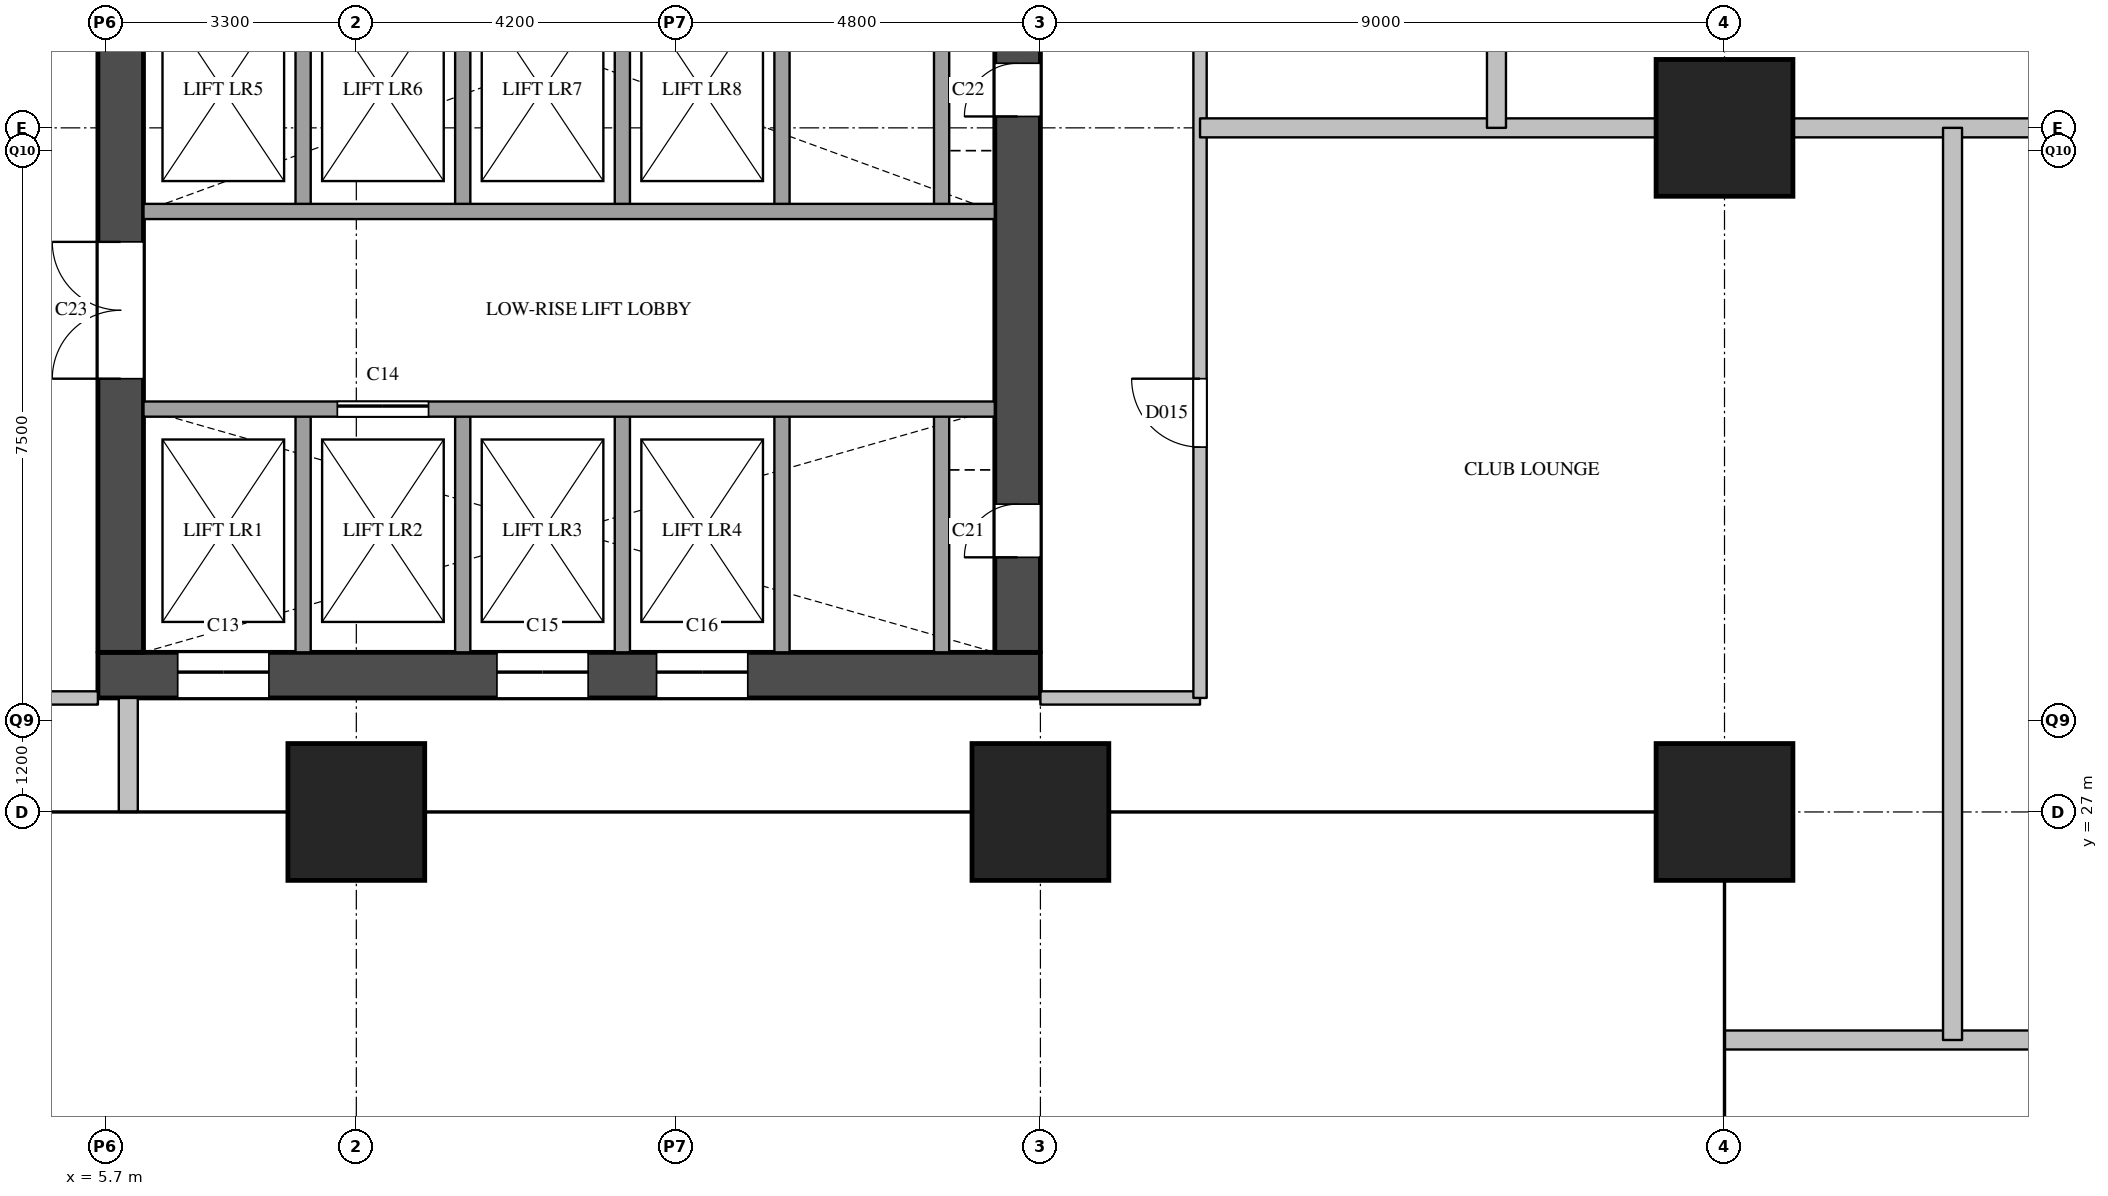
"""IFC4 building model, lengths in metres.
Left out: names, types, materials, properties, quantities, classifications, styles, units other than length and angle.
Written with IfcOpenShell. Run it as: python <this file> out.ifc"""

import sys

from ifc_helpers import new_model, si_unit, direction, frame, frame_2d, origin, origin_2d, place, context, subcontext, project, spatial, rectangle, extrude, element, fill, save


model = new_model("IFC4")
c1 = context("Model", 3, precision=1e-05, world=origin(), true_north=direction((0.0, 1.0)))
c2 = subcontext(c1, "Body", "Model", "MODEL_VIEW")
j1 = project(units=[si_unit("LENGTHUNIT", "METRE"), si_unit("PLANEANGLEUNIT", "RADIAN")], contexts=[c1])
p1 = place(None, origin())
s1 = spatial("IfcSite", under=j1, at=p1, CompositionType="ELEMENT")
p2 = place(p1, origin())
s2 = spatial("IfcBuilding", under=s1, at=p2, CompositionType="ELEMENT")
p3 = place(p2, frame((0.0, 0.0, 93.0)))
s3 = spatial("IfcBuildingStorey", under=s2, at=p3, CompositionType="ELEMENT", Elevation=93.0)
for number, where, z_axis, x_axis in (
    (1, (9.0, 27.0, 0.0), (0.0, 0.0, 1.0), (1.0, 0.0, 0.0)),
    (2, (18.0, 27.0, 0.0), (0.0, 0.0, 1.0), (1.0, 0.0, 0.0)),
    (3, (27.0, 27.0, 0.0), (0.0, 0.0, 1.0), (1.0, 0.0, 0.0)),
    (4, (27.0, 36.0, 0.0), (0.0, 0.0, 1.0), (1.0, 0.0, 0.0)),
):
    element("IfcColumn", number, at=place(p3, frame(where, z_axis=z_axis, x_axis=x_axis)), inside=s3, PredefinedType="COLUMN", context=c2, shape_type="SweptSolid", body=[
        extrude(rectangle(XDim=1.8, YDim=1.8, at=origin_2d()), origin(), (0.0, 0.0, 1.0), 3.8),
    ])
p4 = place(p3, frame((5.6, 28.8, 0.0), z_axis=(0.0, 0.0, 1.0), x_axis=(1.0, 0.0, 0.0)))
e5 = element("IfcWall", 5, at=p4, inside=s3, PredefinedType="SHEAR", context=c2, shape_type="SweptSolid", body=[
    extrude(rectangle(XDim=12.4, YDim=0.6, at=frame_2d((6.2, 0.0))), origin(), (0.0, 0.0, 1.0), 3.5),
])
p5 = place(p4, frame((1.05, 0.0, 0.0)))
e6 = element("IfcOpeningElement", 6, at=p5, cuts=e5, PredefinedType="OPENING", context=c2, shape_type="SweptSolid", body=[
    extrude(rectangle(XDim=1.2, YDim=2.1, at=frame_2d((0.6, 1.05))), frame((0.0, 0.31, 0.0), z_axis=(0.0, -1.0, 0.0), x_axis=(1.0, 0.0, 0.0)), (0.0, 0.0, 1.0), 0.62),
])
p6 = place(p4, frame((5.25, 0.0, 0.0)))
e7 = element("IfcOpeningElement", 7, at=p6, cuts=e5, PredefinedType="OPENING", context=c2, shape_type="SweptSolid", body=[
    extrude(rectangle(XDim=1.2, YDim=2.1, at=frame_2d((0.6, 1.05))), frame((0.0, 0.31, 0.0), z_axis=(0.0, -1.0, 0.0), x_axis=(1.0, 0.0, 0.0)), (0.0, 0.0, 1.0), 0.62),
])
p7 = place(p4, frame((7.35, 0.0, 0.0)))
e8 = element("IfcOpeningElement", 8, at=p7, cuts=e5, PredefinedType="OPENING", context=c2, shape_type="SweptSolid", body=[
    extrude(rectangle(XDim=1.2, YDim=2.1, at=frame_2d((0.6, 1.05))), frame((0.0, 0.31, 0.0), z_axis=(0.0, -1.0, 0.0), x_axis=(1.0, 0.0, 0.0)), (0.0, 0.0, 1.0), 0.62),
])
p8 = place(p3, frame((5.9, 29.1, 0.0), z_axis=(0.0, 0.0, 1.0), x_axis=(0.0, 1.0, 0.0)))
e9 = element("IfcWall", 9, at=p8, inside=s3, PredefinedType="SHEAR", context=c2, shape_type="SweptSolid", body=[
    extrude(rectangle(XDim=20.3, YDim=0.6, at=frame_2d((10.15, 0.0))), origin(), (0.0, 0.0, 1.0), 3.5),
])
p9 = place(p8, frame((3.6, 0.0, 0.0)))
e10 = element("IfcOpeningElement", 10, at=p9, cuts=e9, PredefinedType="OPENING", context=c2, shape_type="SweptSolid", body=[
    extrude(rectangle(XDim=1.8, YDim=2.1, at=frame_2d((0.9, 1.05))), frame((0.0, 0.31, 0.0), z_axis=(0.0, -1.0, 0.0), x_axis=(1.0, 0.0, 0.0)), (0.0, 0.0, 1.0), 0.62),
])
p10 = place(p8, frame((16.4, 0.0, 0.0)))
e11 = element("IfcOpeningElement", 11, at=p10, cuts=e9, PredefinedType="OPENING", context=c2, shape_type="SweptSolid", body=[
    extrude(rectangle(XDim=1.0, YDim=2.1, at=frame_2d((0.5, 1.05))), frame((0.0, 0.31, 0.0), z_axis=(0.0, -1.0, 0.0), x_axis=(1.0, 0.0, 0.0)), (0.0, 0.0, 1.0), 0.62),
])
p11 = place(p3, frame((17.7, 29.1, 0.0), z_axis=(0.0, 0.0, 1.0), x_axis=(0.0, 1.0, 0.0)))
e12 = element("IfcWall", 12, at=p11, inside=s3, PredefinedType="SHEAR", context=c2, shape_type="SweptSolid", body=[
    extrude(rectangle(XDim=20.3, YDim=0.6, at=frame_2d((10.15, 0.0))), origin(), (0.0, 0.0, 1.0), 3.5),
])
p12 = place(p11, frame((1.25, 0.0, 0.0)))
e13 = element("IfcOpeningElement", 13, at=p12, cuts=e12, PredefinedType="OPENING", context=c2, shape_type="SweptSolid", body=[
    extrude(rectangle(XDim=0.7, YDim=2.1, at=frame_2d((0.35, 1.05))), frame((0.0, 0.31, 0.0), z_axis=(0.0, -1.0, 0.0), x_axis=(1.0, 0.0, 0.0)), (0.0, 0.0, 1.0), 0.62),
])
p13 = place(p11, frame((7.05, 0.0, 0.0)))
e14 = element("IfcOpeningElement", 14, at=p13, cuts=e12, PredefinedType="OPENING", context=c2, shape_type="SweptSolid", body=[
    extrude(rectangle(XDim=0.7, YDim=2.1, at=frame_2d((0.35, 1.05))), frame((0.0, 0.31, 0.0), z_axis=(0.0, -1.0, 0.0), x_axis=(1.0, 0.0, 0.0)), (0.0, 0.0, 1.0), 0.62),
])
p14 = place(p3, frame((8.3, 29.1, 0.0), z_axis=(0.0, 0.0, 1.0), x_axis=(0.0, 1.0, 0.0)))
e15 = element("IfcWall", 15, at=p14, inside=s3, PredefinedType="SOLIDWALL", context=c2, shape_type="SweptSolid", body=[
    extrude(rectangle(XDim=3.2, YDim=0.2, at=frame_2d((1.6, 0.0))), origin(), (0.0, 0.0, 1.0), 3.5),
])
p15 = place(p3, frame((8.3, 34.9, 0.0), z_axis=(0.0, 0.0, 1.0), x_axis=(0.0, 1.0, 0.0)))
e16 = element("IfcWall", 16, at=p15, inside=s3, PredefinedType="SOLIDWALL", context=c2, shape_type="SweptSolid", body=[
    extrude(rectangle(XDim=3.2, YDim=0.2, at=frame_2d((1.6, 0.0))), origin(), (0.0, 0.0, 1.0), 3.5),
])
p16 = place(p3, frame((10.4, 29.1, 0.0), z_axis=(0.0, 0.0, 1.0), x_axis=(0.0, 1.0, 0.0)))
e17 = element("IfcWall", 17, at=p16, inside=s3, PredefinedType="SOLIDWALL", context=c2, shape_type="SweptSolid", body=[
    extrude(rectangle(XDim=3.2, YDim=0.2, at=frame_2d((1.6, 0.0))), origin(), (0.0, 0.0, 1.0), 3.5),
])
p17 = place(p3, frame((10.4, 34.9, 0.0), z_axis=(0.0, 0.0, 1.0), x_axis=(0.0, 1.0, 0.0)))
e18 = element("IfcWall", 18, at=p17, inside=s3, PredefinedType="SOLIDWALL", context=c2, shape_type="SweptSolid", body=[
    extrude(rectangle(XDim=3.2, YDim=0.2, at=frame_2d((1.6, 0.0))), origin(), (0.0, 0.0, 1.0), 3.5),
])
p18 = place(p3, frame((12.5, 29.1, 0.0), z_axis=(0.0, 0.0, 1.0), x_axis=(0.0, 1.0, 0.0)))
e19 = element("IfcWall", 19, at=p18, inside=s3, PredefinedType="SOLIDWALL", context=c2, shape_type="SweptSolid", body=[
    extrude(rectangle(XDim=3.2, YDim=0.2, at=frame_2d((1.6, 0.0))), origin(), (0.0, 0.0, 1.0), 3.5),
])
p19 = place(p3, frame((12.5, 34.9, 0.0), z_axis=(0.0, 0.0, 1.0), x_axis=(0.0, 1.0, 0.0)))
e20 = element("IfcWall", 20, at=p19, inside=s3, PredefinedType="SOLIDWALL", context=c2, shape_type="SweptSolid", body=[
    extrude(rectangle(XDim=3.2, YDim=0.2, at=frame_2d((1.6, 0.0))), origin(), (0.0, 0.0, 1.0), 3.5),
])
p20 = place(p3, frame((14.6, 29.1, 0.0), z_axis=(0.0, 0.0, 1.0), x_axis=(0.0, 1.0, 0.0)))
e21 = element("IfcWall", 21, at=p20, inside=s3, PredefinedType="SOLIDWALL", context=c2, shape_type="SweptSolid", body=[
    extrude(rectangle(XDim=3.2, YDim=0.2, at=frame_2d((1.6, 0.0))), origin(), (0.0, 0.0, 1.0), 3.5),
])
p21 = place(p3, frame((14.6, 34.9, 0.0), z_axis=(0.0, 0.0, 1.0), x_axis=(0.0, 1.0, 0.0)))
e22 = element("IfcWall", 22, at=p21, inside=s3, PredefinedType="SOLIDWALL", context=c2, shape_type="SweptSolid", body=[
    extrude(rectangle(XDim=3.2, YDim=0.2, at=frame_2d((1.6, 0.0))), origin(), (0.0, 0.0, 1.0), 3.5),
])
p22 = place(p3, frame((16.7, 29.1, 0.0), z_axis=(0.0, 0.0, 1.0), x_axis=(0.0, 1.0, 0.0)))
e23 = element("IfcWall", 23, at=p22, inside=s3, PredefinedType="SOLIDWALL", context=c2, shape_type="SweptSolid", body=[
    extrude(rectangle(XDim=3.2, YDim=0.2, at=frame_2d((1.6, 0.0))), origin(), (0.0, 0.0, 1.0), 3.5),
])
p23 = place(p3, frame((16.7, 34.9, 0.0), z_axis=(0.0, 0.0, 1.0), x_axis=(0.0, 1.0, 0.0)))
e24 = element("IfcWall", 24, at=p23, inside=s3, PredefinedType="SOLIDWALL", context=c2, shape_type="SweptSolid", body=[
    extrude(rectangle(XDim=3.2, YDim=0.2, at=frame_2d((1.6, 0.0))), origin(), (0.0, 0.0, 1.0), 3.5),
])
p24 = place(p3, frame((6.2, 32.3, 0.0), z_axis=(0.0, 0.0, 1.0), x_axis=(1.0, 0.0, 0.0)))
e25 = element("IfcWall", 25, at=p24, inside=s3, PredefinedType="SOLIDWALL", context=c2, shape_type="SweptSolid", body=[
    extrude(rectangle(XDim=11.2, YDim=0.2, at=frame_2d((5.6, 0.0))), origin(), (0.0, 0.0, 1.0), 3.5),
])
p25 = place(p24, frame((2.55, 0.0, 0.0)))
e26 = element("IfcOpeningElement", 26, at=p25, cuts=e25, PredefinedType="OPENING", context=c2, shape_type="SweptSolid", body=[
    extrude(rectangle(XDim=1.2, YDim=2.1, at=frame_2d((0.6, 1.05))), frame((0.0, 0.11, 0.0), z_axis=(0.0, -1.0, 0.0), x_axis=(1.0, 0.0, 0.0)), (0.0, 0.0, 1.0), 0.22),
])
p26 = place(p3, frame((6.2, 34.9, 0.0), z_axis=(0.0, 0.0, 1.0), x_axis=(1.0, 0.0, 0.0)))
e27 = element("IfcWall", 27, at=p26, inside=s3, PredefinedType="SOLIDWALL", context=c2, shape_type="SweptSolid", body=[
    extrude(rectangle(XDim=11.2, YDim=0.2, at=frame_2d((5.6, 0.0))), origin(), (0.0, 0.0, 1.0), 3.5),
])
for number, where, z_axis, x_axis in (
    (28, (3.5, 28.5, 0.0), (0.0, 0.0, 1.0), (1.0, 0.0, 0.0)),
    (29, (18.0, 28.5, 0.0), (0.0, 0.0, 1.0), (1.0, 0.0, 0.0)),
):
    element("IfcWall", number, at=place(p3, frame(where, z_axis=z_axis, x_axis=x_axis)), inside=s3, PredefinedType="PARTITIONING", context=c2, shape_type="SweptSolid", body=[
        extrude(rectangle(XDim=2.1, YDim=0.175, at=frame_2d((1.05, 0.0))), origin(), (0.0, 0.0, 1.0), 3.5),
    ])
p27 = place(p3, frame((20.1, 28.5, 0.0), z_axis=(0.0, 0.0, 1.0), x_axis=(0.0, 1.0, 0.0)))
e30 = element("IfcWall", 30, at=p27, inside=s3, PredefinedType="PARTITIONING", context=c2, shape_type="SweptSolid", body=[
    extrude(rectangle(XDim=23.6, YDim=0.175, at=frame_2d((11.8, 0.0))), origin(), (0.0, 0.0, 1.0), 3.5),
])
p28 = place(p27, frame((3.3, 0.0, 0.0)))
e31 = element("IfcOpeningElement", 31, at=p28, cuts=e30, PredefinedType="OPENING", context=c2, shape_type="SweptSolid", body=[
    extrude(rectangle(XDim=0.9, YDim=2.1, at=frame_2d((0.45, 1.05))), frame((0.0, 0.097, 0.0), z_axis=(0.0, -1.0, 0.0), x_axis=(1.0, 0.0, 0.0)), (0.0, 0.0, 1.0), 0.195),
])
p29 = place(p27, frame((15.1, 0.0, 0.0)))
e32 = element("IfcOpeningElement", 32, at=p29, cuts=e30, PredefinedType="OPENING", context=c2, shape_type="SweptSolid", body=[
    extrude(rectangle(XDim=0.9, YDim=2.1, at=frame_2d((0.45, 1.05))), frame((0.0, 0.097, 0.0), z_axis=(0.0, -1.0, 0.0), x_axis=(1.0, 0.0, 0.0)), (0.0, 0.0, 1.0), 0.195),
])
p30 = place(p3, frame((27.0, 24.0, 0.0), z_axis=(0.0, 0.0, 1.0), x_axis=(1.0, 0.0, 0.0)))
e33 = element("IfcWall", 33, at=p30, inside=s3, PredefinedType="PARTITIONING", context=c2, shape_type="SweptSolid", body=[
    extrude(rectangle(XDim=6.9, YDim=0.25, at=frame_2d((3.45, 0.0))), origin(), (0.0, 0.0, 1.0), 2.5),
])
p31 = place(p3, frame((20.1, 36.0, 0.0), z_axis=(0.0, 0.0, 1.0), x_axis=(1.0, 0.0, 0.0)))
e34 = element("IfcWall", 34, at=p31, inside=s3, PredefinedType="PARTITIONING", context=c2, shape_type="SweptSolid", body=[
    extrude(rectangle(XDim=13.8, YDim=0.25, at=frame_2d((6.9, 0.0))), origin(), (0.0, 0.0, 1.0), 3.5),
])
p32 = place(p3, frame((6.0, 27.0, 0.0), z_axis=(0.0, 0.0, 1.0), x_axis=(0.0, 1.0, 0.0)))
e35 = element("IfcWall", 35, at=p32, inside=s3, PredefinedType="PARTITIONING", context=c2, shape_type="SweptSolid", body=[
    extrude(rectangle(XDim=1.5, YDim=0.25, at=frame_2d((0.75, 0.0))), origin(), (0.0, 0.0, 1.0), 2.5),
])
p33 = place(p3, frame((24.0, 36.0, 0.0), z_axis=(0.0, 0.0, 1.0), x_axis=(0.0, 1.0, 0.0)))
e36 = element("IfcWall", 36, at=p33, inside=s3, PredefinedType="PARTITIONING", context=c2, shape_type="SweptSolid", body=[
    extrude(rectangle(XDim=18.0, YDim=0.25, at=frame_2d((9.0, 0.0))), origin(), (0.0, 0.0, 1.0), 2.5),
])
p34 = place(p3, frame((30.0, 24.0, 0.0), z_axis=(0.0, 0.0, 1.0), x_axis=(0.0, 1.0, 0.0)))
e37 = element("IfcWall", 37, at=p34, inside=s3, PredefinedType="PARTITIONING", context=c2, shape_type="SweptSolid", body=[
    extrude(rectangle(XDim=12.0, YDim=0.25, at=frame_2d((6.0, 0.0))), origin(), (0.0, 0.0, 1.0), 2.5),
])
p35 = place(p5, origin())
e38 = element("IfcDoor", 38, at=p35, inside=s3, OperationType="SLIDING_TO_LEFT", PredefinedType="DOOR", context=c2, shape_type="SweptSolid", body=[
    extrude(rectangle(XDim=1.2, YDim=2.1, at=frame_2d((0.6, 1.05))), frame((0.0, 0.025, 0.0), z_axis=(0.0, -1.0, 0.0), x_axis=(1.0, 0.0, 0.0)), (0.0, 0.0, 1.0), 0.05),
])
fill(e6, e38)
p36 = place(p25, origin())
e39 = element("IfcDoor", 39, at=p36, inside=s3, OperationType="SLIDING_TO_LEFT", PredefinedType="DOOR", context=c2, shape_type="SweptSolid", body=[
    extrude(rectangle(XDim=1.2, YDim=2.1, at=frame_2d((0.6, 1.05))), frame((0.0, 0.025, 0.0), z_axis=(0.0, -1.0, 0.0), x_axis=(1.0, 0.0, 0.0)), (0.0, 0.0, 1.0), 0.05),
])
fill(e26, e39)
p37 = place(p6, origin())
e40 = element("IfcDoor", 40, at=p37, inside=s3, OperationType="SLIDING_TO_LEFT", PredefinedType="DOOR", context=c2, shape_type="SweptSolid", body=[
    extrude(rectangle(XDim=1.2, YDim=2.1, at=frame_2d((0.6, 1.05))), frame((0.0, 0.025, 0.0), z_axis=(0.0, -1.0, 0.0), x_axis=(1.0, 0.0, 0.0)), (0.0, 0.0, 1.0), 0.05),
])
fill(e7, e40)
p38 = place(p7, origin())
e41 = element("IfcDoor", 41, at=p38, inside=s3, OperationType="SLIDING_TO_LEFT", PredefinedType="DOOR", context=c2, shape_type="SweptSolid", body=[
    extrude(rectangle(XDim=1.2, YDim=2.1, at=frame_2d((0.6, 1.05))), frame((0.0, 0.025, 0.0), z_axis=(0.0, -1.0, 0.0), x_axis=(1.0, 0.0, 0.0)), (0.0, 0.0, 1.0), 0.05),
])
fill(e8, e41)
p39 = place(p12, origin())
e42 = element("IfcDoor", 42, at=p39, inside=s3, OperationType="SINGLE_SWING_LEFT", PredefinedType="DOOR", context=c2, shape_type="SweptSolid", body=[
    extrude(rectangle(XDim=0.7, YDim=2.1, at=frame_2d((0.35, 1.05))), frame((0.0, 0.025, 0.0), z_axis=(0.0, -1.0, 0.0), x_axis=(1.0, 0.0, 0.0)), (0.0, 0.0, 1.0), 0.05),
])
fill(e13, e42)
p40 = place(p13, origin())
e43 = element("IfcDoor", 43, at=p40, inside=s3, OperationType="SINGLE_SWING_LEFT", PredefinedType="DOOR", context=c2, shape_type="SweptSolid", body=[
    extrude(rectangle(XDim=0.7, YDim=2.1, at=frame_2d((0.35, 1.05))), frame((0.0, 0.025, 0.0), z_axis=(0.0, -1.0, 0.0), x_axis=(1.0, 0.0, 0.0)), (0.0, 0.0, 1.0), 0.05),
])
fill(e14, e43)
p41 = place(p9, origin())
e44 = element("IfcDoor", 44, at=p41, inside=s3, OperationType="DOUBLE_DOOR_SINGLE_SWING", PredefinedType="DOOR", context=c2, shape_type="SweptSolid", body=[
    extrude(rectangle(XDim=1.8, YDim=2.1, at=frame_2d((0.9, 1.05))), frame((0.0, 0.025, 0.0), z_axis=(0.0, -1.0, 0.0), x_axis=(1.0, 0.0, 0.0)), (0.0, 0.0, 1.0), 0.05),
])
fill(e10, e44)
p42 = place(p28, origin())
e45 = element("IfcDoor", 45, at=p42, inside=s3, OperationType="SINGLE_SWING_RIGHT", PredefinedType="DOOR", context=c2, shape_type="SweptSolid", body=[
    extrude(rectangle(XDim=0.9, YDim=2.1, at=frame_2d((0.45, 1.05))), frame((0.0, 0.025, 0.0), z_axis=(0.0, -1.0, 0.0), x_axis=(1.0, 0.0, 0.0)), (0.0, 0.0, 1.0), 0.05),
])
fill(e31, e45)
save(model, sys.argv[1])
